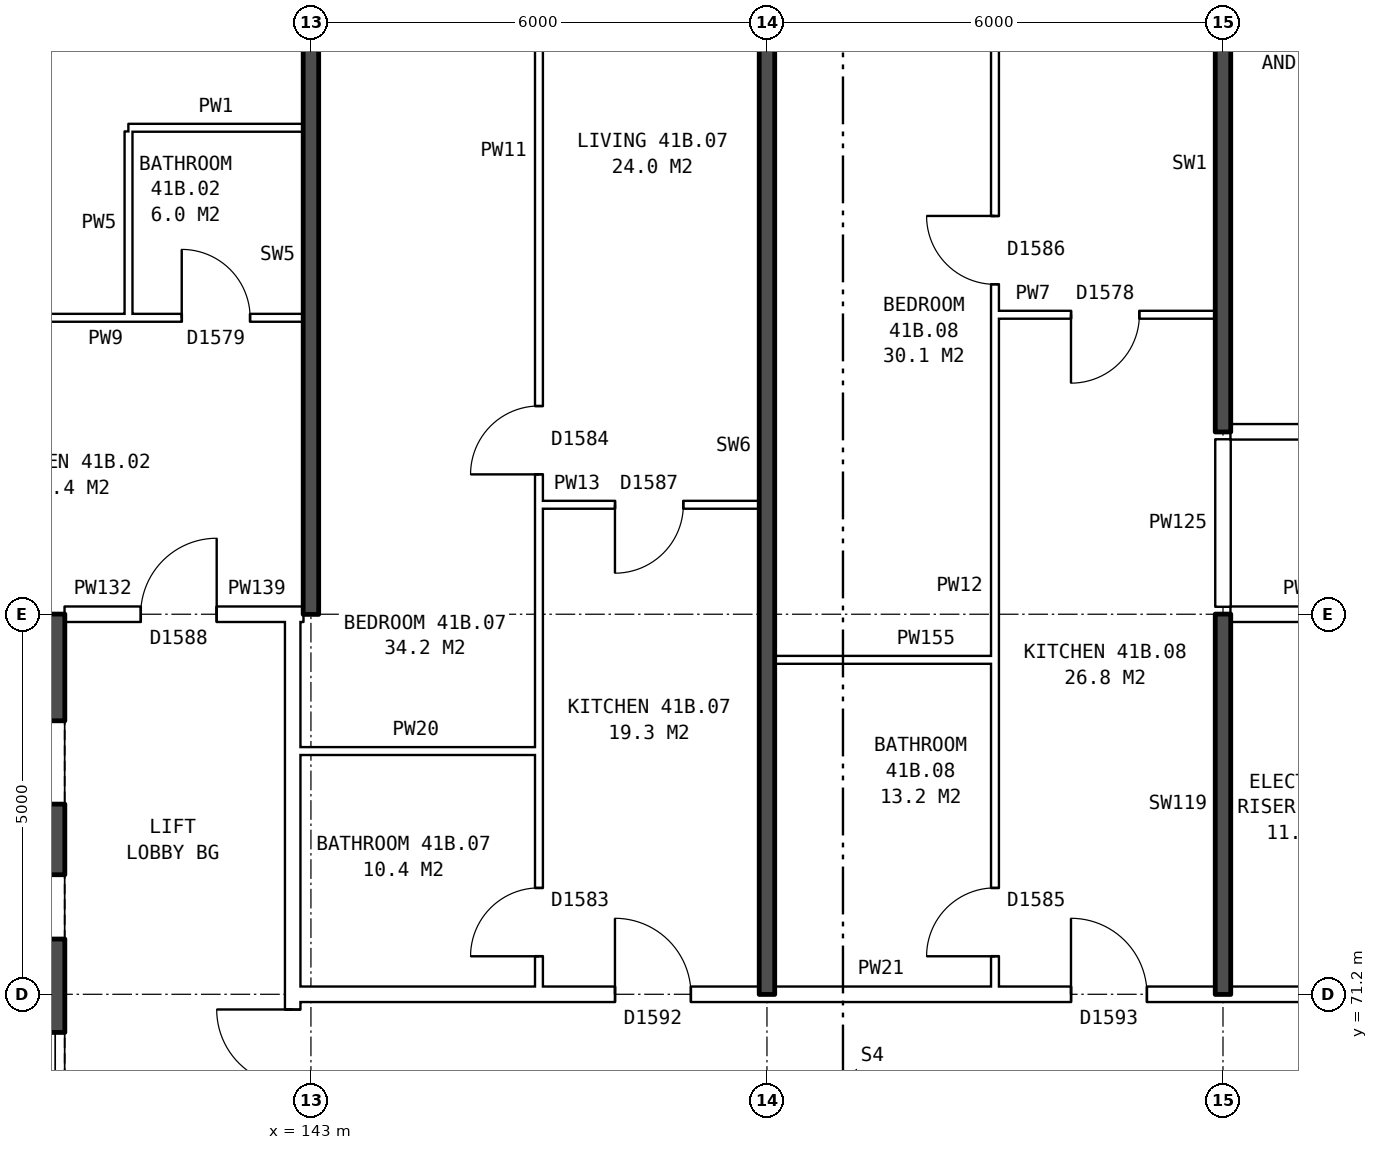
"""IFC4 building model, lengths in metres.
Left out: names, types, materials, properties, quantities, classifications, styles, units other than length and angle.
Written with IfcOpenShell. Run it as: python <this file> out.ifc"""

import sys

from ifc_helpers import new_model, si_unit, direction, frame, frame_2d, origin, place, context, subcontext, project, spatial, rectangle, extrude, element, fill, save


model = new_model("IFC4")
c1 = context("Model", 3, precision=1e-05, world=origin(), true_north=direction((0.0, 1.0)))
c2 = subcontext(c1, "Body", "Model", "MODEL_VIEW")
j1 = project(units=[si_unit("LENGTHUNIT", "METRE"), si_unit("PLANEANGLEUNIT", "RADIAN")], contexts=[c1])
p1 = place(None, origin())
s1 = spatial("IfcSite", under=j1, at=p1, CompositionType="ELEMENT")
p2 = place(p1, origin())
s2 = spatial("IfcBuilding", under=s1, at=p2, CompositionType="ELEMENT")
p3 = place(p2, frame((0.0, 0.0, 148.5)))
s3 = spatial("IfcBuildingStorey", under=s2, at=p3, CompositionType="ELEMENT", Elevation=148.5)
p4 = place(p3, frame((139.51, 63.8, 0.0), z_axis=(0.0, 0.0, 1.0), x_axis=(0.0, 1.0, 0.0)))
e1 = element("IfcWall", 1, at=p4, inside=s3, PredefinedType="SHEAR", context=c2, shape_type="SweptSolid", body=[
    extrude(rectangle(XDim=12.4, YDim=0.5, at=frame_2d((6.2, 0.0))), origin(), (0.0, 0.0, 1.0), 2.85),
])
p5 = place(p4, frame((1.325, 0.0, 0.0)))
e2 = element("IfcOpeningElement", 2, at=p5, cuts=e1, PredefinedType="OPENING", context=c2, shape_type="SweptSolid", body=[
    extrude(rectangle(XDim=1.1, YDim=2.1, at=frame_2d((0.55, 1.05))), frame((0.0, 0.26, 0.0), z_axis=(0.0, -1.0, 0.0), x_axis=(1.0, 0.0, 0.0)), (0.0, 0.0, 1.0), 0.52),
])
p6 = place(p4, frame((3.6, 0.0, 0.0)))
e3 = element("IfcOpeningElement", 3, at=p6, cuts=e1, PredefinedType="OPENING", context=c2, shape_type="SweptSolid", body=[
    extrude(rectangle(XDim=1.1, YDim=2.1, at=frame_2d((0.55, 1.05))), frame((0.0, 0.26, 0.0), z_axis=(0.0, -1.0, 0.0), x_axis=(1.0, 0.0, 0.0)), (0.0, 0.0, 1.0), 0.52),
])
p7 = place(p4, frame((5.8, 0.0, 0.0)))
e4 = element("IfcOpeningElement", 4, at=p7, cuts=e1, PredefinedType="OPENING", context=c2, shape_type="SweptSolid", body=[
    extrude(rectangle(XDim=1.1, YDim=2.1, at=frame_2d((0.55, 1.05))), frame((0.0, 0.26, 0.0), z_axis=(0.0, -1.0, 0.0), x_axis=(1.0, 0.0, 0.0)), (0.0, 0.0, 1.0), 0.52),
])
p8 = place(p4, frame((9.9, 0.0, 0.0)))
e5 = element("IfcOpeningElement", 5, at=p8, cuts=e1, PredefinedType="OPENING", context=c2, shape_type="SweptSolid", body=[
    extrude(rectangle(XDim=1.1, YDim=2.1, at=frame_2d((0.55, 1.05))), frame((0.0, 0.26, 0.0), z_axis=(0.0, -1.0, 0.0), x_axis=(1.0, 0.0, 0.0)), (0.0, 0.0, 1.0), 0.52),
])
p9 = place(p4, frame((8.125, 0.0, 0.0)))
e6 = element("IfcOpeningElement", 6, at=p9, cuts=e1, PredefinedType="OPENING", context=c2, shape_type="SweptSolid", body=[
    extrude(rectangle(XDim=0.85, YDim=2.1, at=frame_2d((0.425, 1.05))), frame((0.0, 0.26, 0.0), z_axis=(0.0, -1.0, 0.0), x_axis=(1.0, 0.0, 0.0)), (0.0, 0.0, 1.0), 0.52),
])
p10 = place(p3, frame((142.76, 63.9, 0.0), z_axis=(0.0, 0.0, 1.0), x_axis=(0.0, 1.0, 0.0)))
e7 = element("IfcWall", 7, at=p10, inside=s3, PredefinedType="PARTITIONING", context=c2, shape_type="SweptSolid", body=[
    extrude(rectangle(XDim=12.2, YDim=0.2, at=frame_2d((6.1, 0.0))), origin(), (0.0, 0.0, 1.0), 2.85),
])
p11 = place(p10, frame((5.1, 0.0, 0.0)))
e8 = element("IfcOpeningElement", 8, at=p11, cuts=e7, PredefinedType="OPENING", context=c2, shape_type="SweptSolid", body=[
    extrude(rectangle(XDim=2.0, YDim=2.1, at=frame_2d((1.0, 1.05))), frame((0.0, 0.11, 0.0), z_axis=(0.0, -1.0, 0.0), x_axis=(1.0, 0.0, 0.0)), (0.0, 0.0, 1.0), 0.22),
])
p12 = place(p3, frame((142.76, 71.2, 0.0), z_axis=(0.0, 0.0, 1.0), x_axis=(1.0, 0.0, 0.0)))
e9 = element("IfcWall", 9, at=p12, inside=s3, PredefinedType="PARTITIONING", context=c2, shape_type="SweptSolid", body=[
    extrude(rectangle(XDim=14.48, YDim=0.2, at=frame_2d((7.24, 0.0))), origin(), (0.0, 0.0, 1.0), 2.85),
])
p13 = place(p12, frame((4.24, 0.0, 0.0)))
e10 = element("IfcOpeningElement", 10, at=p13, cuts=e9, PredefinedType="OPENING", context=c2, shape_type="SweptSolid", body=[
    extrude(rectangle(XDim=1.0, YDim=2.1, at=frame_2d((0.5, 1.05))), frame((0.0, 0.11, 0.0), z_axis=(0.0, -1.0, 0.0), x_axis=(1.0, 0.0, 0.0)), (0.0, 0.0, 1.0), 0.22),
])
p14 = place(p12, frame((10.24, 0.0, 0.0)))
e11 = element("IfcOpeningElement", 11, at=p14, cuts=e9, PredefinedType="OPENING", context=c2, shape_type="SweptSolid", body=[
    extrude(rectangle(XDim=1.0, YDim=2.1, at=frame_2d((0.5, 1.05))), frame((0.0, 0.11, 0.0), z_axis=(0.0, -1.0, 0.0), x_axis=(1.0, 0.0, 0.0)), (0.0, 0.0, 1.0), 0.22),
])
p15 = place(p3, frame((142.76, 74.4, 0.0), z_axis=(0.0, 0.0, 1.0), x_axis=(1.0, 0.0, 0.0)))
e12 = element("IfcWall", 12, at=p15, inside=s3, PredefinedType="PARTITIONING", context=c2, shape_type="SweptSolid", body=[
    extrude(rectangle(XDim=3.24, YDim=0.1, at=frame_2d((1.62, 0.0))), origin(), (0.0, 0.0, 1.0), 2.85),
])
p16 = place(p3, frame((149.1, 75.6, 0.0), z_axis=(0.0, 0.0, 1.0), x_axis=(1.0, 0.0, 0.0)))
e13 = element("IfcWall", 13, at=p16, inside=s3, PredefinedType="PARTITIONING", context=c2, shape_type="SweptSolid", body=[
    extrude(rectangle(XDim=2.9, YDim=0.1, at=frame_2d((1.45, 0.0))), origin(), (0.0, 0.0, 1.0), 2.85),
])
p17 = place(p3, frame((139.76, 76.2, 0.0), z_axis=(0.0, 0.0, 1.0), x_axis=(1.0, 0.0, 0.0)))
e14 = element("IfcWall", 14, at=p17, inside=s3, PredefinedType="PARTITIONING", context=c2, shape_type="SweptSolid", body=[
    extrude(rectangle(XDim=3.0, YDim=0.2, at=frame_2d((1.5, 0.0))), origin(), (0.0, 0.0, 1.0), 2.85),
])
p18 = place(p17, frame((1.0, 0.0, 0.0)))
e15 = element("IfcOpeningElement", 15, at=p18, cuts=e14, PredefinedType="OPENING", context=c2, shape_type="SweptSolid", body=[
    extrude(rectangle(XDim=1.0, YDim=2.1, at=frame_2d((0.5, 1.05))), frame((0.0, 0.11, 0.0), z_axis=(0.0, -1.0, 0.0), x_axis=(1.0, 0.0, 0.0)), (0.0, 0.0, 1.0), 0.22),
])
p19 = place(p3, frame((142.76, 76.2, 0.0), z_axis=(0.0, 0.0, 1.0), x_axis=(1.0, 0.0, 0.0)))
e16 = element("IfcWall", 16, at=p19, inside=s3, PredefinedType="PARTITIONING", context=c2, shape_type="SweptSolid", body=[
    extrude(rectangle(XDim=0.14, YDim=0.2, at=frame_2d((0.07, 0.0))), origin(), (0.0, 0.0, 1.0), 2.85),
])
p20 = place(p3, frame((155.1, 76.2, 0.0), z_axis=(0.0, 0.0, 1.0), x_axis=(1.0, 0.0, 0.0)))
e17 = element("IfcWall", 17, at=p20, inside=s3, PredefinedType="PARTITIONING", context=c2, shape_type="SweptSolid", body=[
    extrude(rectangle(XDim=2.14, YDim=0.2, at=frame_2d((1.07, 0.0))), origin(), (0.0, 0.0, 1.0), 2.85),
])
p21 = place(p3, frame((146.0, 77.64, 0.0), z_axis=(0.0, 0.0, 1.0), x_axis=(1.0, 0.0, 0.0)))
e18 = element("IfcWall", 18, at=p21, inside=s3, PredefinedType="PARTITIONING", context=c2, shape_type="SweptSolid", body=[
    extrude(rectangle(XDim=2.9, YDim=0.1, at=frame_2d((1.45, 0.0))), origin(), (0.0, 0.0, 1.0), 2.85),
])
p22 = place(p21, frame((1.0, 0.0, 0.0)))
e19 = element("IfcOpeningElement", 19, at=p22, cuts=e18, PredefinedType="OPENING", context=c2, shape_type="SweptSolid", body=[
    extrude(rectangle(XDim=0.9, YDim=2.1, at=frame_2d((0.45, 1.05))), frame((0.0, 0.06, 0.0), z_axis=(0.0, -1.0, 0.0), x_axis=(1.0, 0.0, 0.0)), (0.0, 0.0, 1.0), 0.12),
])
p23 = place(p3, frame((155.1, 78.6, 0.0), z_axis=(0.0, 0.0, 1.0), x_axis=(1.0, 0.0, 0.0)))
e20 = element("IfcWall", 20, at=p23, inside=s3, PredefinedType="PARTITIONING", context=c2, shape_type="SweptSolid", body=[
    extrude(rectangle(XDim=16.04, YDim=0.2, at=frame_2d((8.02, 0.0))), origin(), (0.0, 0.0, 1.0), 2.85),
])
p24 = place(p23, frame((1.45, 0.0, 0.0)))
e21 = element("IfcOpeningElement", 21, at=p24, cuts=e20, PredefinedType="OPENING", context=c2, shape_type="SweptSolid", body=[
    extrude(rectangle(XDim=1.0, YDim=2.1, at=frame_2d((0.5, 1.05))), frame((0.0, 0.11, 0.0), z_axis=(0.0, -1.0, 0.0), x_axis=(1.0, 0.0, 0.0)), (0.0, 0.0, 1.0), 0.22),
])
p25 = place(p23, frame((8.4, 0.0, 0.0)))
e22 = element("IfcOpeningElement", 22, at=p25, cuts=e20, PredefinedType="OPENING", context=c2, shape_type="SweptSolid", body=[
    extrude(rectangle(XDim=1.0, YDim=2.1, at=frame_2d((0.5, 1.05))), frame((0.0, 0.11, 0.0), z_axis=(0.0, -1.0, 0.0), x_axis=(1.0, 0.0, 0.0)), (0.0, 0.0, 1.0), 0.22),
])
p26 = place(p3, frame((137.1, 80.1, 0.0), z_axis=(0.0, 0.0, 1.0), x_axis=(1.0, 0.0, 0.0)))
e23 = element("IfcWall", 23, at=p26, inside=s3, PredefinedType="PARTITIONING", context=c2, shape_type="SweptSolid", body=[
    extrude(rectangle(XDim=5.8, YDim=0.1, at=frame_2d((2.9, 0.0))), origin(), (0.0, 0.0, 1.0), 2.85),
])
p27 = place(p26, frame((1.3, 0.0, 0.0)))
e24 = element("IfcOpeningElement", 24, at=p27, cuts=e23, PredefinedType="OPENING", context=c2, shape_type="SweptSolid", body=[
    extrude(rectangle(XDim=0.9, YDim=2.1, at=frame_2d((0.45, 1.05))), frame((0.0, 0.06, 0.0), z_axis=(0.0, -1.0, 0.0), x_axis=(1.0, 0.0, 0.0)), (0.0, 0.0, 1.0), 0.12),
])
p28 = place(p26, frame((4.2, 0.0, 0.0)))
e25 = element("IfcOpeningElement", 25, at=p28, cuts=e23, PredefinedType="OPENING", context=c2, shape_type="SweptSolid", body=[
    extrude(rectangle(XDim=0.9, YDim=2.1, at=frame_2d((0.45, 1.05))), frame((0.0, 0.06, 0.0), z_axis=(0.0, -1.0, 0.0), x_axis=(1.0, 0.0, 0.0)), (0.0, 0.0, 1.0), 0.12),
])
p29 = place(p3, frame((152.0, 80.14, 0.0), z_axis=(0.0, 0.0, 1.0), x_axis=(1.0, 0.0, 0.0)))
e26 = element("IfcWall", 26, at=p29, inside=s3, PredefinedType="PARTITIONING", context=c2, shape_type="SweptSolid", body=[
    extrude(rectangle(XDim=2.9, YDim=0.1, at=frame_2d((1.45, 0.0))), origin(), (0.0, 0.0, 1.0), 2.85),
])
p30 = place(p29, frame((1.0, 0.0, 0.0)))
e27 = element("IfcOpeningElement", 27, at=p30, cuts=e26, PredefinedType="OPENING", context=c2, shape_type="SweptSolid", body=[
    extrude(rectangle(XDim=0.9, YDim=2.1, at=frame_2d((0.45, 1.05))), frame((0.0, 0.06, 0.0), z_axis=(0.0, -1.0, 0.0), x_axis=(1.0, 0.0, 0.0)), (0.0, 0.0, 1.0), 0.12),
])
p31 = place(p3, frame((140.6, 82.6, 0.0), z_axis=(0.0, 0.0, 1.0), x_axis=(1.0, 0.0, 0.0)))
e28 = element("IfcWall", 28, at=p31, inside=s3, PredefinedType="PARTITIONING", context=c2, shape_type="SweptSolid", body=[
    extrude(rectangle(XDim=2.3, YDim=0.1, at=frame_2d((1.15, 0.0))), origin(), (0.0, 0.0, 1.0), 2.85),
])
p32 = place(p3, frame((140.6, 80.15, 0.0), z_axis=(0.0, 0.0, 1.0), x_axis=(0.0, 1.0, 0.0)))
e29 = element("IfcWall", 29, at=p32, inside=s3, PredefinedType="PARTITIONING", context=c2, shape_type="SweptSolid", body=[
    extrude(rectangle(XDim=2.4, YDim=0.1, at=frame_2d((1.2, 0.0))), origin(), (0.0, 0.0, 1.0), 2.85),
])
p33 = place(p3, frame((143.0, 76.2, 0.0), z_axis=(0.0, 0.0, 1.0), x_axis=(0.0, 1.0, 0.0)))
e30 = element("IfcWall", 30, at=p33, inside=s3, PredefinedType="SOLIDWALL", context=c2, shape_type="SweptSolid", body=[
    extrude(rectangle(XDim=9.44, YDim=0.2, at=frame_2d((4.72, 0.0))), origin(), (0.0, 0.0, 1.0), 2.85),
])
p34 = place(p3, frame((146.0, 71.3, 0.0), z_axis=(0.0, 0.0, 1.0), x_axis=(0.0, 1.0, 0.0)))
e31 = element("IfcWall", 31, at=p34, inside=s3, PredefinedType="PARTITIONING", context=c2, shape_type="SweptSolid", body=[
    extrude(rectangle(XDim=14.34, YDim=0.1, at=frame_2d((7.17, 0.0))), origin(), (0.0, 0.0, 1.0), 2.85),
])
p35 = place(p34, frame((6.74, 0.0, 0.0)))
e32 = element("IfcOpeningElement", 32, at=p35, cuts=e31, PredefinedType="OPENING", context=c2, shape_type="SweptSolid", body=[
    extrude(rectangle(XDim=0.9, YDim=2.1, at=frame_2d((0.45, 1.05))), frame((0.0, 0.06, 0.0), z_axis=(0.0, -1.0, 0.0), x_axis=(1.0, 0.0, 0.0)), (0.0, 0.0, 1.0), 0.12),
])
p36 = place(p34, frame((0.4, 0.0, 0.0)))
e33 = element("IfcOpeningElement", 33, at=p36, cuts=e31, PredefinedType="OPENING", context=c2, shape_type="SweptSolid", body=[
    extrude(rectangle(XDim=0.9, YDim=2.1, at=frame_2d((0.45, 1.05))), frame((0.0, 0.06, 0.0), z_axis=(0.0, -1.0, 0.0), x_axis=(1.0, 0.0, 0.0)), (0.0, 0.0, 1.0), 0.12),
])
p37 = place(p3, frame((149.0, 71.2, 0.0), z_axis=(0.0, 0.0, 1.0), x_axis=(0.0, 1.0, 0.0)))
e34 = element("IfcWall", 34, at=p37, inside=s3, PredefinedType="SOLIDWALL", context=c2, shape_type="SweptSolid", body=[
    extrude(rectangle(XDim=14.44, YDim=0.2, at=frame_2d((7.22, 0.0))), origin(), (0.0, 0.0, 1.0), 2.85),
])
p38 = place(p3, frame((152.0, 71.3, 0.0), z_axis=(0.0, 0.0, 1.0), x_axis=(0.0, 1.0, 0.0)))
e35 = element("IfcWall", 35, at=p38, inside=s3, PredefinedType="PARTITIONING", context=c2, shape_type="SweptSolid", body=[
    extrude(rectangle(XDim=14.34, YDim=0.1, at=frame_2d((7.17, 0.0))), origin(), (0.0, 0.0, 1.0), 2.85),
])
p39 = place(p38, frame((9.24, 0.0, 0.0)))
e36 = element("IfcOpeningElement", 36, at=p39, cuts=e35, PredefinedType="OPENING", context=c2, shape_type="SweptSolid", body=[
    extrude(rectangle(XDim=0.9, YDim=2.1, at=frame_2d((0.45, 1.05))), frame((0.0, 0.06, 0.0), z_axis=(0.0, -1.0, 0.0), x_axis=(1.0, 0.0, 0.0)), (0.0, 0.0, 1.0), 0.12),
])
p40 = place(p38, frame((0.4, 0.0, 0.0)))
e37 = element("IfcOpeningElement", 37, at=p40, cuts=e35, PredefinedType="OPENING", context=c2, shape_type="SweptSolid", body=[
    extrude(rectangle(XDim=0.9, YDim=2.1, at=frame_2d((0.45, 1.05))), frame((0.0, 0.06, 0.0), z_axis=(0.0, -1.0, 0.0), x_axis=(1.0, 0.0, 0.0)), (0.0, 0.0, 1.0), 0.12),
])
p41 = place(p3, frame((155.0, 71.2, 0.0), z_axis=(0.0, 0.0, 1.0), x_axis=(0.0, 1.0, 0.0)))
e38 = element("IfcWall", 38, at=p41, inside=s3, PredefinedType="SOLIDWALL", context=c2, shape_type="SweptSolid", body=[
    extrude(rectangle(XDim=5.0, YDim=0.2, at=frame_2d((2.5, 0.0))), origin(), (0.0, 0.0, 1.0), 2.85),
])
p42 = place(p3, frame((155.0, 76.3, 0.0), z_axis=(0.0, 0.0, 1.0), x_axis=(0.0, 1.0, 0.0)))
e39 = element("IfcWall", 39, at=p42, inside=s3, PredefinedType="PARTITIONING", context=c2, shape_type="SweptSolid", body=[
    extrude(rectangle(XDim=2.2, YDim=0.2, at=frame_2d((1.1, 0.0))), origin(), (0.0, 0.0, 1.0), 2.85),
])
p43 = place(p3, frame((155.0, 78.6, 0.0), z_axis=(0.0, 0.0, 1.0), x_axis=(0.0, 1.0, 0.0)))
e40 = element("IfcWall", 40, at=p43, inside=s3, PredefinedType="SOLIDWALL", context=c2, shape_type="SweptSolid", body=[
    extrude(rectangle(XDim=7.04, YDim=0.2, at=frame_2d((3.52, 0.0))), origin(), (0.0, 0.0, 1.0), 2.85),
])
p44 = place(p11, origin())
e41 = element("IfcDoor", 41, at=p44, inside=s3, OperationType="DOUBLE_DOOR_SINGLE_SWING", PredefinedType="DOOR", context=c2, shape_type="SweptSolid", body=[
    extrude(rectangle(XDim=2.0, YDim=2.1, at=frame_2d((1.0, 1.05))), frame((0.0, 0.025, 0.0), z_axis=(0.0, -1.0, 0.0), x_axis=(1.0, 0.0, 0.0)), (0.0, 0.0, 1.0), 0.05),
])
fill(e8, e41)
p45 = place(p18, origin())
e42 = element("IfcDoor", 42, at=p45, inside=s3, OperationType="SINGLE_SWING_RIGHT", PredefinedType="DOOR", context=c2, shape_type="SweptSolid", body=[
    extrude(rectangle(XDim=1.0, YDim=2.1, at=frame_2d((0.5, 1.05))), frame((0.0, 0.025, 0.0), z_axis=(0.0, -1.0, 0.0), x_axis=(1.0, 0.0, 0.0)), (0.0, 0.0, 1.0), 0.05),
])
fill(e15, e42)
p46 = place(p28, origin())
e43 = element("IfcDoor", 43, at=p46, inside=s3, OperationType="SINGLE_SWING_LEFT", PredefinedType="DOOR", context=c2, shape_type="SweptSolid", body=[
    extrude(rectangle(XDim=0.9, YDim=2.1, at=frame_2d((0.45, 1.05))), frame((0.0, 0.025, 0.0), z_axis=(0.0, -1.0, 0.0), x_axis=(1.0, 0.0, 0.0)), (0.0, 0.0, 1.0), 0.05),
])
fill(e25, e43)
p47 = place(p35, origin())
e44 = element("IfcDoor", 44, at=p47, inside=s3, OperationType="SINGLE_SWING_LEFT", PredefinedType="DOOR", context=c2, shape_type="SweptSolid", body=[
    extrude(rectangle(XDim=0.9, YDim=2.1, at=frame_2d((0.45, 1.05))), frame((0.0, 0.025, 0.0), z_axis=(0.0, -1.0, 0.0), x_axis=(1.0, 0.0, 0.0)), (0.0, 0.0, 1.0), 0.05),
])
fill(e32, e44)
p48 = place(p13, origin())
e45 = element("IfcDoor", 45, at=p48, inside=s3, OperationType="SINGLE_SWING_LEFT", PredefinedType="DOOR", context=c2, shape_type="SweptSolid", body=[
    extrude(rectangle(XDim=1.0, YDim=2.1, at=frame_2d((0.5, 1.05))), frame((0.0, 0.025, 0.0), z_axis=(0.0, -1.0, 0.0), x_axis=(1.0, 0.0, 0.0)), (0.0, 0.0, 1.0), 0.05),
])
fill(e10, e45)
p49 = place(p22, frame((0.9, 0.0, 0.0), z_axis=(0.0, 0.0, 1.0), x_axis=(-1.0, 0.0, 0.0)))
e46 = element("IfcDoor", 46, at=p49, inside=s3, OperationType="SINGLE_SWING_RIGHT", PredefinedType="DOOR", context=c2, shape_type="SweptSolid", body=[
    extrude(rectangle(XDim=0.9, YDim=2.1, at=frame_2d((0.45, 1.05))), frame((0.0, 0.025, 0.0), z_axis=(0.0, -1.0, 0.0), x_axis=(1.0, 0.0, 0.0)), (0.0, 0.0, 1.0), 0.05),
])
fill(e19, e46)
p50 = place(p36, origin())
e47 = element("IfcDoor", 47, at=p50, inside=s3, OperationType="SINGLE_SWING_LEFT", PredefinedType="DOOR", context=c2, shape_type="SweptSolid", body=[
    extrude(rectangle(XDim=0.9, YDim=2.1, at=frame_2d((0.45, 1.05))), frame((0.0, 0.025, 0.0), z_axis=(0.0, -1.0, 0.0), x_axis=(1.0, 0.0, 0.0)), (0.0, 0.0, 1.0), 0.05),
])
fill(e33, e47)
p51 = place(p39, origin())
e48 = element("IfcDoor", 48, at=p51, inside=s3, OperationType="SINGLE_SWING_RIGHT", PredefinedType="DOOR", context=c2, shape_type="SweptSolid", body=[
    extrude(rectangle(XDim=0.9, YDim=2.1, at=frame_2d((0.45, 1.05))), frame((0.0, 0.025, 0.0), z_axis=(0.0, -1.0, 0.0), x_axis=(1.0, 0.0, 0.0)), (0.0, 0.0, 1.0), 0.05),
])
fill(e36, e48)
p52 = place(p14, origin())
e49 = element("IfcDoor", 49, at=p52, inside=s3, OperationType="SINGLE_SWING_LEFT", PredefinedType="DOOR", context=c2, shape_type="SweptSolid", body=[
    extrude(rectangle(XDim=1.0, YDim=2.1, at=frame_2d((0.5, 1.05))), frame((0.0, 0.025, 0.0), z_axis=(0.0, -1.0, 0.0), x_axis=(1.0, 0.0, 0.0)), (0.0, 0.0, 1.0), 0.05),
])
fill(e11, e49)
p53 = place(p30, frame((0.9, 0.0, 0.0), z_axis=(0.0, 0.0, 1.0), x_axis=(-1.0, 0.0, 0.0)))
e50 = element("IfcDoor", 50, at=p53, inside=s3, OperationType="SINGLE_SWING_RIGHT", PredefinedType="DOOR", context=c2, shape_type="SweptSolid", body=[
    extrude(rectangle(XDim=0.9, YDim=2.1, at=frame_2d((0.45, 1.05))), frame((0.0, 0.025, 0.0), z_axis=(0.0, -1.0, 0.0), x_axis=(1.0, 0.0, 0.0)), (0.0, 0.0, 1.0), 0.05),
])
fill(e27, e50)
p54 = place(p40, origin())
e51 = element("IfcDoor", 51, at=p54, inside=s3, OperationType="SINGLE_SWING_LEFT", PredefinedType="DOOR", context=c2, shape_type="SweptSolid", body=[
    extrude(rectangle(XDim=0.9, YDim=2.1, at=frame_2d((0.45, 1.05))), frame((0.0, 0.025, 0.0), z_axis=(0.0, -1.0, 0.0), x_axis=(1.0, 0.0, 0.0)), (0.0, 0.0, 1.0), 0.05),
])
fill(e37, e51)
save(model, sys.argv[1])
